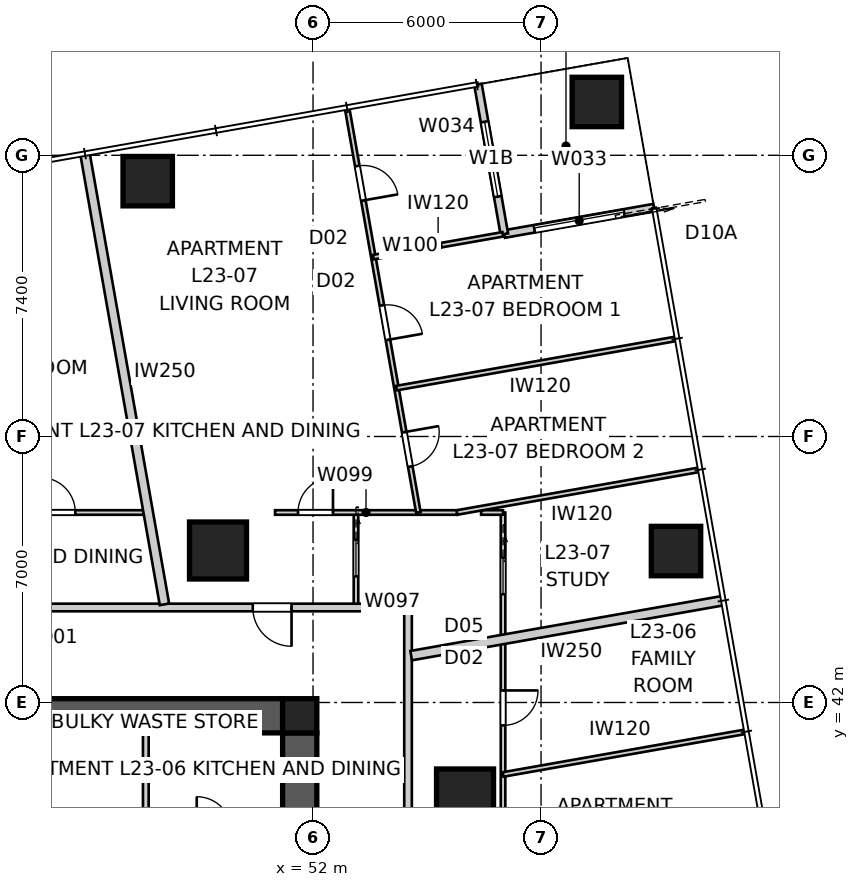
"""IFC4 building model, lengths in metres.
Left out: names, types, materials, properties, quantities, classifications, styles, units other than length and angle.
Written with IfcOpenShell. Run it as: python <this file> out.ifc"""

import sys

from ifc_helpers import new_model, si_unit, direction, frame, frame_2d, origin, origin_2d, place, context, subcontext, project, spatial, polyline, rectangle, outline, extrude, element, fill, save


model = new_model("IFC4")
c1 = context("Model", 3, precision=1e-05, world=origin(), true_north=direction((0.0, 1.0)))
c2 = subcontext(c1, "Body", "Model", "MODEL_VIEW")
j1 = project(units=[si_unit("LENGTHUNIT", "METRE"), si_unit("PLANEANGLEUNIT", "RADIAN")], contexts=[c1])
p1 = place(None, origin())
s1 = spatial("IfcSite", under=j1, at=p1, CompositionType="ELEMENT")
p2 = place(p1, origin())
s2 = spatial("IfcBuilding", under=s1, at=p2, CompositionType="ELEMENT")
p3 = place(p2, frame((0.0, 0.0, 86.2)))
s3 = spatial("IfcBuildingStorey", under=s2, at=p3, CompositionType="ELEMENT", Elevation=86.2)
p4 = place(p3, frame((28.8, 41.65, 0.0), z_axis=(0.0, 0.0, 1.0), x_axis=(1.0, 0.0, 0.0)))
e1 = element("IfcWall", 1, at=p4, inside=s3, PredefinedType="SHEAR", context=c2, shape_type="SweptSolid", body=[
    extrude(outline(polyline([(0.0, -0.45), (22.4, -0.45), (22.4, -0.025), (22.85, -0.025), (22.85, 0.025), (22.4, 0.025), (22.4, 0.45), (0.0, 0.45), (0.0, 0.025), (-0.45, 0.025), (-0.45, -0.025), (0.0, -0.025), (0.0, -0.45)])), origin(), (0.0, 0.0, 1.0), 3.4),
])
p5 = place(p3, frame((51.65, 18.8, 0.0), z_axis=(0.0, 0.0, 1.0), x_axis=(0.0, 1.0, 0.0)))
e2 = element("IfcWall", 2, at=p5, inside=s3, PredefinedType="SHEAR", context=c2, shape_type="SweptSolid", body=[
    extrude(outline(polyline([(0.0, -0.45), (22.4, -0.45), (22.4, -0.025), (22.85, -0.025), (22.85, 0.025), (22.4, 0.025), (22.4, 0.45), (0.0, 0.45), (0.0, 0.025), (-0.45, 0.025), (-0.45, -0.025), (0.0, -0.025), (0.0, -0.45)])), origin(), (0.0, 0.0, 1.0), 3.4),
])
p6 = place(p5, frame((11.14, 0.0, 0.0)))
e3 = element("IfcOpeningElement", 3, at=p6, cuts=e2, PredefinedType="OPENING", context=c2, shape_type="SweptSolid", body=[
    extrude(rectangle(XDim=1.02, YDim=2.4, at=frame_2d((0.51, 1.2))), frame((0.0, 0.46, 0.0), z_axis=(0.0, -1.0, 0.0), x_axis=(1.0, 0.0, 0.0)), (0.0, 0.0, 1.0), 0.92),
])
p7 = place(p3, frame((51.65, 41.65, 0.0), z_axis=(0.0, 0.0, 1.0), x_axis=(1.0, 0.0, 0.0)))
e4 = element("IfcColumn", 4, at=p7, inside=s3, PredefinedType="COLUMN", context=c2, shape_type="SweptSolid", body=[
    extrude(rectangle(XDim=0.9, YDim=0.9, at=origin_2d()), origin(), (0.0, 0.0, 1.0), 3.4),
])
for number, where, z_axis, x_axis in (
    (5, (61.552, 45.985, 0.0), (0.0, 0.0, 1.0), (1.0, 0.0, 0.0)),
    (6, (59.468, 57.803, 0.0), (0.0, 0.0, 1.0), (1.0, 0.0, 0.0)),
    (7, (47.65, 55.719, 0.0), (0.0, 0.0, 1.0), (1.0, 0.0, 0.0)),
):
    element("IfcColumn", number, at=place(p3, frame(where, z_axis=z_axis, x_axis=x_axis)), inside=s3, PredefinedType="COLUMN", context=c2, shape_type="SweptSolid", body=[
        extrude(rectangle(XDim=1.3, YDim=1.3, at=origin_2d()), origin(), (0.0, 0.0, 1.0), 3.4),
    ])
for number, where, z_axis, x_axis in (
    (8, (56.0, 39.5, 0.0), (0.0, 0.0, 1.0), (1.0, 0.0, 0.0)),
    (9, (49.5, 46.0, 0.0), (0.0, 0.0, 1.0), (1.0, 0.0, 0.0)),
):
    element("IfcColumn", number, at=place(p3, frame(where, z_axis=z_axis, x_axis=x_axis)), inside=s3, PredefinedType="COLUMN", context=c2, shape_type="SweptSolid", body=[
        extrude(rectangle(XDim=1.5, YDim=1.5, at=origin_2d()), origin(), (0.0, 0.0, 1.0), 3.4),
    ])
p8 = place(p3, frame((60.974, 55.022, 0.0), z_axis=(0.0, 0.0, 1.0), x_axis=(-0.984808127031, -0.173646056486, 0.0)))
e10 = element("IfcWall", 10, at=p8, inside=s3, PredefinedType="SOLIDWALL", context=c2, shape_type="SweptSolid", body=[
    extrude(rectangle(XDim=4.0, YDim=0.2, at=frame_2d((2.0, 0.0))), origin(), (0.0, 0.0, 1.0), 3.25),
])
p9 = place(p8, frame((0.8, 0.0, 0.0)))
e11 = element("IfcOpeningElement", 11, at=p9, cuts=e10, PredefinedType="OPENING", context=c2, shape_type="SweptSolid", body=[
    extrude(rectangle(XDim=2.4, YDim=2.1, at=frame_2d((1.2, 1.05))), frame((0.0, 0.11, 0.0), z_axis=(0.0, -1.0, 0.0), x_axis=(1.0, 0.0, 0.0)), (0.0, 0.0, 1.0), 0.22),
])
p10 = place(p3, frame((57.034, 54.328, 0.0), z_axis=(0.0, 0.0, 1.0), x_axis=(-0.173646056486, 0.984808127031, 0.0)))
e12 = element("IfcWall", 12, at=p10, inside=s3, PredefinedType="SOLIDWALL", context=c2, shape_type="SweptSolid", body=[
    extrude(rectangle(XDim=4.0, YDim=0.2, at=frame_2d((2.0, 0.0))), origin(), (0.0, 0.0, 1.0), 3.25),
])
p11 = place(p10, frame((1.0, 0.0, 0.45)))
e13 = element("IfcOpeningElement", 13, at=p11, cuts=e12, PredefinedType="OPENING", context=c2, shape_type="SweptSolid", body=[
    extrude(rectangle(XDim=2.0, YDim=1.8, at=frame_2d((1.0, 0.9))), frame((0.0, 0.11, 0.0), z_axis=(0.0, -1.0, 0.0), x_axis=(1.0, 0.0, 0.0)), (0.0, 0.0, 1.0), 0.22),
])
p12 = place(p3, frame((54.5, 15.5, 0.0), z_axis=(0.0, 0.0, 1.0), x_axis=(0.0, 1.0, 0.0)))
e14 = element("IfcWall", 14, at=p12, inside=s3, PredefinedType="PARTITIONING", context=c2, shape_type="SweptSolid", body=[
    extrude(rectangle(XDim=29.0, YDim=0.2, at=frame_2d((14.5, 0.0))), origin(), (0.0, 0.0, 1.0), 3.25),
])
p13 = place(p12, frame((21.815, 0.0, 0.0)))
e15 = element("IfcOpeningElement", 15, at=p13, cuts=e14, PredefinedType="OPENING", context=c2, shape_type="SweptSolid", body=[
    extrude(rectangle(XDim=1.02, YDim=2.34, at=frame_2d((0.51, 1.17))), frame((0.0, 0.11, 0.0), z_axis=(0.0, -1.0, 0.0), x_axis=(1.0, 0.0, 0.0)), (0.0, 0.0, 1.0), 0.22),
])
p14 = place(p12, frame((2.855, 0.0, 0.0)))
e16 = element("IfcOpeningElement", 16, at=p14, cuts=e14, PredefinedType="OPENING", context=c2, shape_type="SweptSolid", body=[
    extrude(rectangle(XDim=1.02, YDim=2.1, at=frame_2d((0.51, 1.05))), frame((0.0, 0.11, 0.0), z_axis=(0.0, -1.0, 0.0), x_axis=(1.0, 0.0, 0.0)), (0.0, 0.0, 1.0), 0.22),
])
p15 = place(p3, frame((54.5, 44.5, 0.0), z_axis=(0.0, 0.0, 1.0), x_axis=(-1.0, 0.0, 0.0)))
e17 = element("IfcWall", 17, at=p15, inside=s3, PredefinedType="PARTITIONING", context=c2, shape_type="SweptSolid", body=[
    extrude(rectangle(XDim=29.0, YDim=0.2, at=frame_2d((14.5, 0.0))), origin(), (0.0, 0.0, 1.0), 3.25),
])
p16 = place(p15, frame((10.129, 0.0, 0.0)))
e18 = element("IfcOpeningElement", 18, at=p16, cuts=e17, PredefinedType="OPENING", context=c2, shape_type="SweptSolid", body=[
    extrude(rectangle(XDim=1.02, YDim=2.34, at=frame_2d((0.51, 1.17))), frame((0.0, 0.11, 0.0), z_axis=(0.0, -1.0, 0.0), x_axis=(1.0, 0.0, 0.0)), (0.0, 0.0, 1.0), 0.22),
])
p17 = place(p15, frame((3.065, 0.0, 0.0)))
e19 = element("IfcOpeningElement", 19, at=p17, cuts=e17, PredefinedType="OPENING", context=c2, shape_type="SweptSolid", body=[
    extrude(rectangle(XDim=1.02, YDim=2.1, at=frame_2d((0.51, 1.05))), frame((0.0, 0.11, 0.0), z_axis=(0.0, -1.0, 0.0), x_axis=(1.0, 0.0, 0.0)), (0.0, 0.0, 1.0), 0.22),
])
p18 = place(p3, frame((62.797, 44.682, 0.0), z_axis=(0.0, 0.0, 1.0), x_axis=(-0.984807121942, -0.173651756605, 0.0)))
e20 = element("IfcWall", 20, at=p18, inside=s3, PredefinedType="PARTITIONING", context=c2, shape_type="SweptSolid", body=[
    extrude(rectangle(XDim=8.341, YDim=0.25, at=frame_2d((4.171, 0.0))), origin(), (0.0, 0.0, 1.0), 3.25),
])
p19 = place(p3, frame((45.999, 56.444, 0.0), z_axis=(0.0, 0.0, 1.0), x_axis=(0.173654664517, -0.984806609184, 0.0)))
e21 = element("IfcWall", 21, at=p19, inside=s3, PredefinedType="PARTITIONING", context=c2, shape_type="SweptSolid", body=[
    extrude(rectangle(XDim=12.044, YDim=0.25, at=frame_2d((6.022, 0.0))), origin(), (0.0, 0.0, 1.0), 3.25),
])
p20 = place(p3, frame((47.6, 41.2, 0.0), z_axis=(0.0, 0.0, 1.0), x_axis=(0.0, -1.0, 0.0)))
e22 = element("IfcWall", 22, at=p20, inside=s3, PredefinedType="SOLIDWALL", context=c2, shape_type="SweptSolid", body=[
    extrude(rectangle(XDim=5.9, YDim=0.15, at=frame_2d((2.95, 0.0))), origin(), (0.0, 0.0, 1.0), 3.25),
])
p21 = place(p3, frame((57.0, 47.0, 0.0), z_axis=(0.0, 0.0, 1.0), x_axis=(0.0, -1.0, 0.0)))
e23 = element("IfcWall", 23, at=p21, inside=s3, PredefinedType="PARTITIONING", context=c2, shape_type="SweptSolid", body=[
    extrude(rectangle(XDim=34.0, YDim=0.12, at=frame_2d((17.0, 0.0))), origin(), (0.0, 0.0, 1.0), 2.55),
])
p22 = place(p21, frame((8.361, 0.0, 0.0)))
e24 = element("IfcOpeningElement", 24, at=p22, cuts=e23, PredefinedType="OPENING", context=c2, shape_type="SweptSolid", body=[
    extrude(rectangle(XDim=0.92, YDim=2.34, at=frame_2d((0.46, 1.17))), frame((0.0, 0.07, 0.0), z_axis=(0.0, -1.0, 0.0), x_axis=(1.0, 0.0, 0.0)), (0.0, 0.0, 1.0), 0.14),
])
p23 = place(p21, frame((11.166, 0.0, 0.0)))
e25 = element("IfcOpeningElement", 25, at=p23, cuts=e23, PredefinedType="OPENING", context=c2, shape_type="SweptSolid", body=[
    extrude(rectangle(XDim=0.92, YDim=2.34, at=frame_2d((0.46, 1.17))), frame((0.0, 0.07, 0.0), z_axis=(0.0, -1.0, 0.0), x_axis=(1.0, 0.0, 0.0)), (0.0, 0.0, 1.0), 0.14),
])
p24 = place(p21, frame((4.683, 0.0, 0.0)))
e26 = element("IfcOpeningElement", 26, at=p24, cuts=e23, PredefinedType="OPENING", context=c2, shape_type="SweptSolid", body=[
    extrude(rectangle(XDim=0.92, YDim=2.34, at=frame_2d((0.46, 1.17))), frame((0.0, 0.07, 0.0), z_axis=(0.0, -1.0, 0.0), x_axis=(1.0, 0.0, 0.0)), (0.0, 0.0, 1.0), 0.14),
])
p25 = place(p21, frame((27.784, 0.0, 0.0)))
e27 = element("IfcOpeningElement", 27, at=p25, cuts=e23, PredefinedType="OPENING", context=c2, shape_type="SweptSolid", body=[
    extrude(rectangle(XDim=0.92, YDim=2.34, at=frame_2d((0.46, 1.17))), frame((0.0, 0.07, 0.0), z_axis=(0.0, -1.0, 0.0), x_axis=(1.0, 0.0, 0.0)), (0.0, 0.0, 1.0), 0.14),
])
p26 = place(p21, frame((31.939, 0.0, 0.0)))
e28 = element("IfcOpeningElement", 28, at=p26, cuts=e23, PredefinedType="OPENING", context=c2, shape_type="SweptSolid", body=[
    extrude(rectangle(XDim=0.92, YDim=2.34, at=frame_2d((0.46, 1.17))), frame((0.0, 0.07, 0.0), z_axis=(0.0, -1.0, 0.0), x_axis=(1.0, 0.0, 0.0)), (0.0, 0.0, 1.0), 0.14),
])
p27 = place(p21, frame((15.601, 0.0, 0.0)))
e29 = element("IfcOpeningElement", 29, at=p27, cuts=e23, PredefinedType="OPENING", context=c2, shape_type="SweptSolid", body=[
    extrude(rectangle(XDim=0.96, YDim=2.1, at=frame_2d((0.48, 1.05))), frame((0.0, 0.07, 0.0), z_axis=(0.0, -1.0, 0.0), x_axis=(1.0, 0.0, 0.0)), (0.0, 0.0, 1.0), 0.14),
])
p28 = place(p21, frame((18.21, 0.0, 0.0)))
e30 = element("IfcOpeningElement", 30, at=p28, cuts=e23, PredefinedType="OPENING", context=c2, shape_type="SweptSolid", body=[
    extrude(rectangle(XDim=0.96, YDim=2.1, at=frame_2d((0.48, 1.05))), frame((0.0, 0.07, 0.0), z_axis=(0.0, -1.0, 0.0), x_axis=(1.0, 0.0, 0.0)), (0.0, 0.0, 1.0), 0.14),
])
p29 = place(p21, frame((1.19, 0.0, 0.0)))
e31 = element("IfcOpeningElement", 31, at=p29, cuts=e23, PredefinedType="OPENING", context=c2, shape_type="SweptSolid", body=[
    extrude(rectangle(XDim=0.96, YDim=2.1, at=frame_2d((0.48, 1.05))), frame((0.0, 0.07, 0.0), z_axis=(0.0, -1.0, 0.0), x_axis=(1.0, 0.0, 0.0)), (0.0, 0.0, 1.0), 0.14),
])
p30 = place(p3, frame((57.0, 40.105, 0.0), z_axis=(0.0, 0.0, 1.0), x_axis=(0.984809025774, 0.173640959323, 0.0)))
e32 = element("IfcWall", 32, at=p30, inside=s3, PredefinedType="PARTITIONING", context=c2, shape_type="SweptSolid", body=[
    extrude(rectangle(XDim=6.463, YDim=0.12, at=frame_2d((3.232, 0.0))), origin(), (0.0, 0.0, 1.0), 3.25),
])
p31 = place(p3, frame((53.13, 47.0, 0.0), z_axis=(0.0, 0.0, 1.0), x_axis=(0.0, -1.0, 0.0)))
e33 = element("IfcWall", 33, at=p31, inside=s3, PredefinedType="PARTITIONING", context=c2, shape_type="SweptSolid", body=[
    extrude(rectangle(XDim=2.4, YDim=0.12, at=frame_2d((1.2, 0.0))), origin(), (0.0, 0.0, 1.0), 3.25),
])
p32 = place(p31, frame((0.72, 0.0, 0.0)))
e34 = element("IfcOpeningElement", 34, at=p32, cuts=e33, PredefinedType="OPENING", context=c2, shape_type="SweptSolid", body=[
    extrude(rectangle(XDim=0.96, YDim=2.1, at=frame_2d((0.48, 1.05))), frame((0.0, 0.07, 0.0), z_axis=(0.0, -1.0, 0.0), x_axis=(1.0, 0.0, 0.0)), (0.0, 0.0, 1.0), 0.14),
])
p33 = place(p3, frame((23.0, 47.0, 0.0), z_axis=(0.0, 0.0, 1.0), x_axis=(1.0, 0.0, 0.0)))
e35 = element("IfcWall", 35, at=p33, inside=s3, PredefinedType="PARTITIONING", context=c2, shape_type="SweptSolid", body=[
    extrude(rectangle(XDim=24.771, YDim=0.12, at=frame_2d((12.386, 0.0))), origin(), (0.0, 0.0, 1.0), 2.55),
])
p34 = place(p33, frame((21.825, 0.0, 0.0)))
e36 = element("IfcOpeningElement", 36, at=p34, cuts=e35, PredefinedType="OPENING", context=c2, shape_type="SweptSolid", body=[
    extrude(rectangle(XDim=0.92, YDim=2.34, at=frame_2d((0.46, 1.17))), frame((0.0, 0.07, 0.0), z_axis=(0.0, -1.0, 0.0), x_axis=(1.0, 0.0, 0.0)), (0.0, 0.0, 1.0), 0.14),
])
p35 = place(p33, frame((11.135, 0.0, 0.0)))
e37 = element("IfcOpeningElement", 37, at=p35, cuts=e35, PredefinedType="OPENING", context=c2, shape_type="SweptSolid", body=[
    extrude(rectangle(XDim=0.96, YDim=2.1, at=frame_2d((0.48, 1.05))), frame((0.0, 0.07, 0.0), z_axis=(0.0, -1.0, 0.0), x_axis=(1.0, 0.0, 0.0)), (0.0, 0.0, 1.0), 0.14),
])
p36 = place(p33, frame((1.19, 0.0, 0.0)))
e38 = element("IfcOpeningElement", 38, at=p36, cuts=e35, PredefinedType="OPENING", context=c2, shape_type="SweptSolid", body=[
    extrude(rectangle(XDim=0.96, YDim=2.1, at=frame_2d((0.48, 1.05))), frame((0.0, 0.07, 0.0), z_axis=(0.0, -1.0, 0.0), x_axis=(1.0, 0.0, 0.0)), (0.0, 0.0, 1.0), 0.14),
])
p37 = place(p33, frame((8.342, 0.0, 0.0)))
e39 = element("IfcOpeningElement", 39, at=p37, cuts=e35, PredefinedType="OPENING", context=c2, shape_type="SweptSolid", body=[
    extrude(rectangle(XDim=0.96, YDim=2.1, at=frame_2d((0.48, 1.05))), frame((0.0, 0.07, 0.0), z_axis=(0.0, -1.0, 0.0), x_axis=(1.0, 0.0, 0.0)), (0.0, 0.0, 1.0), 0.14),
])
p38 = place(p33, frame((4.663, 0.0, 0.0)))
e40 = element("IfcOpeningElement", 40, at=p38, cuts=e35, PredefinedType="OPENING", context=c2, shape_type="SweptSolid", body=[
    extrude(rectangle(XDim=0.96, YDim=2.1, at=frame_2d((0.48, 1.05))), frame((0.0, 0.07, 0.0), z_axis=(0.0, -1.0, 0.0), x_axis=(1.0, 0.0, 0.0)), (0.0, 0.0, 1.0), 0.14),
])
p39 = place(p3, frame((51.0, 47.0, 0.0), z_axis=(0.0, 0.0, 1.0), x_axis=(1.0, 0.0, 0.0)))
e41 = element("IfcWall", 41, at=p39, inside=s3, PredefinedType="PARTITIONING", context=c2, shape_type="SweptSolid", body=[
    extrude(rectangle(XDim=4.789, YDim=0.12, at=frame_2d((2.395, 0.0))), origin(), (0.0, 0.0, 1.0), 2.638),
])
p40 = place(p39, frame((0.605, 0.0, 0.0)))
e42 = element("IfcOpeningElement", 42, at=p40, cuts=e41, PredefinedType="OPENING", context=c2, shape_type="SweptSolid", body=[
    extrude(rectangle(XDim=0.92, YDim=2.34, at=frame_2d((0.46, 1.17))), frame((0.0, 0.07, 0.0), z_axis=(0.0, -1.0, 0.0), x_axis=(1.0, 0.0, 0.0)), (0.0, 0.0, 1.0), 0.14),
])
p41 = place(p3, frame((52.9, 57.62, 0.0), z_axis=(0.0, 0.0, 1.0), x_axis=(0.173651010046, -0.984807253583, 0.0)))
e43 = element("IfcWall", 43, at=p41, inside=s3, PredefinedType="PARTITIONING", context=c2, shape_type="SweptSolid", body=[
    extrude(rectangle(XDim=10.783, YDim=0.12, at=frame_2d((5.392, 0.0))), origin(), (0.0, 0.0, 1.0), 3.25),
])
p42 = place(p41, frame((1.525, 0.0, 0.0)))
e44 = element("IfcOpeningElement", 44, at=p42, cuts=e43, PredefinedType="OPENING", context=c2, shape_type="SweptSolid", body=[
    extrude(rectangle(XDim=0.92, YDim=2.34, at=frame_2d((0.46, 1.17))), frame((0.0, 0.07, 0.0), z_axis=(0.0, -1.0, 0.0), x_axis=(1.0, 0.0, 0.0)), (0.0, 0.0, 1.0), 0.14),
])
p43 = place(p41, frame((5.25, 0.0, 0.0)))
e45 = element("IfcOpeningElement", 45, at=p43, cuts=e43, PredefinedType="OPENING", context=c2, shape_type="SweptSolid", body=[
    extrude(rectangle(XDim=0.92, YDim=2.34, at=frame_2d((0.46, 1.17))), frame((0.0, 0.07, 0.0), z_axis=(0.0, -1.0, 0.0), x_axis=(1.0, 0.0, 0.0)), (0.0, 0.0, 1.0), 0.14),
])
p44 = place(p41, frame((8.637, 0.0, 0.0)))
e46 = element("IfcOpeningElement", 46, at=p44, cuts=e43, PredefinedType="OPENING", context=c2, shape_type="SweptSolid", body=[
    extrude(rectangle(XDim=0.92, YDim=2.34, at=frame_2d((0.46, 1.17))), frame((0.0, 0.07, 0.0), z_axis=(0.0, -1.0, 0.0), x_axis=(1.0, 0.0, 0.0)), (0.0, 0.0, 1.0), 0.14),
])
p45 = place(p3, frame((61.542, 51.568, 0.0), z_axis=(0.0, 0.0, 1.0), x_axis=(-0.984807929323, -0.173647177755, 0.0)))
e47 = element("IfcWall", 47, at=p45, inside=s3, PredefinedType="PARTITIONING", context=c2, shape_type="SweptSolid", body=[
    extrude(rectangle(XDim=7.46, YDim=0.12, at=frame_2d((3.73, 0.0))), origin(), (0.0, 0.0, 1.0), 3.25),
])
p46 = place(p3, frame((53.588, 53.72, 0.0), z_axis=(0.0, 0.0, 1.0), x_axis=(0.984805572884, 0.173660541335, 0.0)))
e48 = element("IfcWall", 48, at=p46, inside=s3, PredefinedType="PARTITIONING", context=c2, shape_type="SweptSolid", body=[
    extrude(rectangle(XDim=3.46, YDim=0.12, at=frame_2d((1.73, 0.0))), origin(), (0.0, 0.0, 1.0), 3.25),
])
p47 = place(p3, frame((62.15, 48.122, 0.0), z_axis=(0.0, 0.0, 1.0), x_axis=(-0.984806762864, -0.173653792983, 0.0)))
e49 = element("IfcWall", 49, at=p47, inside=s3, PredefinedType="PARTITIONING", context=c2, shape_type="SweptSolid", body=[
    extrude(rectangle(XDim=6.459, YDim=0.12, at=frame_2d((3.229, 0.0))), origin(), (0.0, 0.0, 1.0), 2.638),
])
p48 = place(p3, frame((57.0, 47.0, 0.0), z_axis=(0.0, 0.0, 1.0), x_axis=(-1.0, 0.0, 0.0)))
e50 = element("IfcWall", 50, at=p48, inside=s3, PredefinedType="PARTITIONING", context=c2, shape_type="SweptSolid", body=[
    extrude(rectangle(XDim=0.578, YDim=0.12, at=frame_2d((0.289, 0.0))), origin(), (0.0, 0.0, 1.0), 3.25),
])
p49 = place(p9, origin())
e51 = element("IfcDoor", 51, at=p49, inside=s3, OperationType="SLIDING_TO_LEFT", PredefinedType="DOOR", context=c2, shape_type="SweptSolid", body=[
    extrude(rectangle(XDim=2.4, YDim=2.1, at=frame_2d((1.2, 1.05))), frame((0.0, 0.025, 0.0), z_axis=(0.0, -1.0, 0.0), x_axis=(1.0, 0.0, 0.0)), (0.0, 0.0, 1.0), 0.05),
])
fill(e11, e51)
p50 = place(p11, origin())
e52 = element("IfcWindow", 52, at=p50, inside=s3, PartitioningType="SINGLE_PANEL", PredefinedType="WINDOW", context=c2, shape_type="SweptSolid", body=[
    extrude(rectangle(XDim=2.0, YDim=1.8, at=frame_2d((1.0, 0.9))), frame((0.0, 0.03, 0.0), z_axis=(0.0, -1.0, 0.0), x_axis=(1.0, 0.0, 0.0)), (0.0, 0.0, 1.0), 0.06),
])
fill(e13, e52)
p51 = place(p17, origin())
e53 = element("IfcDoor", 53, at=p51, inside=s3, OperationType="SINGLE_SWING_LEFT", PredefinedType="DOOR", context=c2, shape_type="SweptSolid", body=[
    extrude(rectangle(XDim=1.02, YDim=2.1, at=frame_2d((0.51, 1.05))), frame((0.0, 0.025, 0.0), z_axis=(0.0, -1.0, 0.0), x_axis=(1.0, 0.0, 0.0)), (0.0, 0.0, 1.0), 0.05),
])
fill(e19, e53)
p52 = place(p24, origin())
e54 = element("IfcDoor", 54, at=p52, inside=s3, OperationType="SINGLE_SWING_LEFT", PredefinedType="DOOR", context=c2, shape_type="SweptSolid", body=[
    extrude(rectangle(XDim=0.92, YDim=2.34, at=frame_2d((0.46, 1.17))), frame((0.0, 0.025, 0.0), z_axis=(0.0, -1.0, 0.0), x_axis=(1.0, 0.0, 0.0)), (0.0, 0.0, 1.0), 0.05),
])
fill(e26, e54)
p53 = place(p34, origin())
e55 = element("IfcDoor", 55, at=p53, inside=s3, OperationType="SINGLE_SWING_LEFT", PredefinedType="DOOR", context=c2, shape_type="SweptSolid", body=[
    extrude(rectangle(XDim=0.92, YDim=2.34, at=frame_2d((0.46, 1.17))), frame((0.0, 0.025, 0.0), z_axis=(0.0, -1.0, 0.0), x_axis=(1.0, 0.0, 0.0)), (0.0, 0.0, 1.0), 0.05),
])
fill(e36, e55)
p54 = place(p32, origin())
e56 = element("IfcDoor", 56, at=p54, inside=s3, OperationType="SLIDING_TO_LEFT", PredefinedType="DOOR", context=c2, shape_type="SweptSolid", body=[
    extrude(rectangle(XDim=0.96, YDim=2.1, at=frame_2d((0.48, 1.05))), frame((0.0, 0.025, 0.0), z_axis=(0.0, -1.0, 0.0), x_axis=(1.0, 0.0, 0.0)), (0.0, 0.0, 1.0), 0.05),
])
fill(e34, e56)
p55 = place(p40, origin())
e57 = element("IfcDoor", 57, at=p55, inside=s3, OperationType="SINGLE_SWING_RIGHT", PredefinedType="DOOR", context=c2, shape_type="SweptSolid", body=[
    extrude(rectangle(XDim=0.92, YDim=2.34, at=frame_2d((0.46, 1.17))), frame((0.0, 0.025, 0.0), z_axis=(0.0, -1.0, 0.0), x_axis=(1.0, 0.0, 0.0)), (0.0, 0.0, 1.0), 0.05),
])
fill(e42, e57)
p56 = place(p29, origin())
e58 = element("IfcDoor", 58, at=p56, inside=s3, OperationType="SLIDING_TO_LEFT", PredefinedType="DOOR", context=c2, shape_type="SweptSolid", body=[
    extrude(rectangle(XDim=0.96, YDim=2.1, at=frame_2d((0.48, 1.05))), frame((0.0, 0.025, 0.0), z_axis=(0.0, -1.0, 0.0), x_axis=(1.0, 0.0, 0.0)), (0.0, 0.0, 1.0), 0.05),
])
fill(e31, e58)
p57 = place(p42, origin())
e59 = element("IfcDoor", 59, at=p57, inside=s3, OperationType="SINGLE_SWING_RIGHT", PredefinedType="DOOR", context=c2, shape_type="SweptSolid", body=[
    extrude(rectangle(XDim=0.92, YDim=2.34, at=frame_2d((0.46, 1.17))), frame((0.0, 0.025, 0.0), z_axis=(0.0, -1.0, 0.0), x_axis=(1.0, 0.0, 0.0)), (0.0, 0.0, 1.0), 0.05),
])
fill(e44, e59)
p58 = place(p43, origin())
e60 = element("IfcDoor", 60, at=p58, inside=s3, OperationType="SINGLE_SWING_RIGHT", PredefinedType="DOOR", context=c2, shape_type="SweptSolid", body=[
    extrude(rectangle(XDim=0.92, YDim=2.34, at=frame_2d((0.46, 1.17))), frame((0.0, 0.025, 0.0), z_axis=(0.0, -1.0, 0.0), x_axis=(1.0, 0.0, 0.0)), (0.0, 0.0, 1.0), 0.05),
])
fill(e45, e60)
p59 = place(p44, origin())
e61 = element("IfcDoor", 61, at=p59, inside=s3, OperationType="SINGLE_SWING_LEFT", PredefinedType="DOOR", context=c2, shape_type="SweptSolid", body=[
    extrude(rectangle(XDim=0.92, YDim=2.34, at=frame_2d((0.46, 1.17))), frame((0.0, 0.025, 0.0), z_axis=(0.0, -1.0, 0.0), x_axis=(1.0, 0.0, 0.0)), (0.0, 0.0, 1.0), 0.05),
])
fill(e46, e61)
save(model, sys.argv[1])
